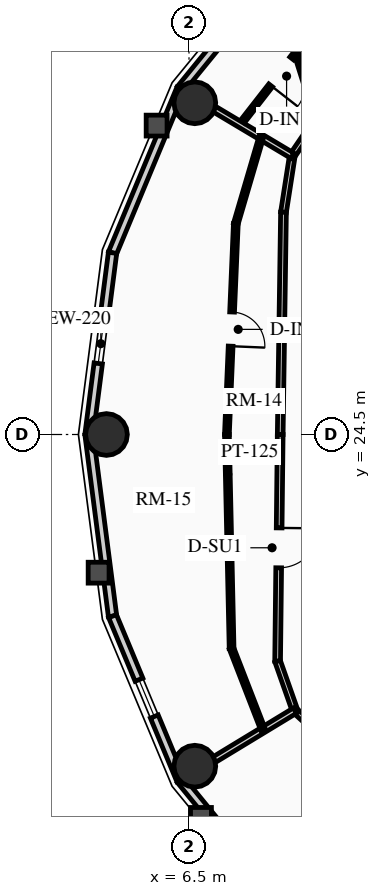
"""IFC4 building model, lengths in metres.
Left out: names, types, materials, properties, quantities, classifications, styles, units other than length and angle.
Written with IfcOpenShell. Run it as: python <this file> out.ifc"""

import sys

from ifc_helpers import new_model, si_unit, direction, frame, frame_2d, origin, origin_2d, place, context, subcontext, project, spatial, rectangle, circle, extrude, source, transform, mapped, element, fill, save


model = new_model("IFC4")
c1 = context("Model", 3, precision=1e-05, world=origin(), true_north=direction((0.0, 1.0)))
c2 = subcontext(c1, "Body", "Model", "MODEL_VIEW")
j1 = project(units=[si_unit("LENGTHUNIT", "METRE"), si_unit("PLANEANGLEUNIT", "RADIAN")], contexts=[c1])
p1 = place(None, origin())
s1 = spatial("IfcSite", under=j1, at=p1, CompositionType="ELEMENT")
p2 = place(p1, origin())
s2 = spatial("IfcBuilding", under=s1, at=p2, CompositionType="ELEMENT")
p3 = place(p2, frame((0.0, 0.0, 217.03)))
s3 = spatial("IfcBuildingStorey", under=s2, at=p3, CompositionType="ELEMENT", Elevation=217.03)
for number, where, z_axis, x_axis in (
    (1, (6.653, 33.229, 0.0), (0.0, 0.0, 1.0), (1.0, 0.0, 0.0)),
    (2, (4.328, 24.5, 0.0), (0.0, 0.0, 1.0), (1.0, 0.0, 0.0)),
    (3, (6.653, 15.771, 0.0), (0.0, 0.0, 1.0), (1.0, 0.0, 0.0)),
):
    element("IfcColumn", number, at=place(p3, frame(where, z_axis=z_axis, x_axis=x_axis)), inside=s3, PredefinedType="USERDEFINED", context=c2, shape_type="SweptSolid", body=[
        extrude(circle(Radius=0.55, at=origin_2d()), origin(), (0.0, 0.0, 1.0), 2.91),
    ])
p4 = place(p3, frame((6.282, 33.593, 0.0), z_axis=(0.0, 0.0, 1.0), x_axis=(0.632467166636, 0.774587169483, 0.0)))
e4 = element("IfcWall", 4, at=p4, inside=s3, PredefinedType="SOLIDWALL", context=c2, shape_type="SweptSolid", body=[
    extrude(rectangle(XDim=4.418, YDim=0.22, at=frame_2d((2.209, 0.0))), origin(), (0.0, 0.0, 1.0), 2.322),
])
m1 = source(origin(), c2, "Body", "SweptSolid", [
    extrude(rectangle(XDim=1.05, YDim=1.3, at=frame_2d((0.525, 0.65))), frame((0.0, 0.12, 0.0), z_axis=(0.0, -1.0, 0.0), x_axis=(1.0, 0.0, 0.0)), (0.0, 0.0, 1.0), 0.24),
])
p5 = place(p4, frame((1.684, 0.0, 0.65)))
e5 = element("IfcOpeningElement", 5, at=p5, cuts=e4, PredefinedType="OPENING", context=c2, shape_type="MappedRepresentation", body=[
    mapped(m1, transform((0.0, 0.0, 0.0), x_axis=(1.0, 0.0, 0.0), y_axis=(0.0, 1.0, 0.0), z_axis=(0.0, 0.0, 1.0), scale=1.0)),
])
p6 = place(p3, frame((4.488, 29.281, 0.0), z_axis=(0.0, 0.0, 1.0), x_axis=(0.384036305194, 0.923317993052, 0.0)))
e6 = element("IfcWall", 6, at=p6, inside=s3, PredefinedType="SOLIDWALL", context=c2, shape_type="SweptSolid", body=[
    extrude(rectangle(XDim=4.671, YDim=0.22, at=frame_2d((2.335, 0.0))), origin(), (0.0, 0.0, 1.0), 2.322),
])
p7 = place(p3, frame((3.87, 24.5, 0.0), z_axis=(0.0, 0.0, 1.0), x_axis=(0.128241318541, 0.991742993027, 0.0)))
e7 = element("IfcWall", 7, at=p7, inside=s3, PredefinedType="SOLIDWALL", context=c2, shape_type="SweptSolid", body=[
    extrude(rectangle(XDim=4.82, YDim=0.22, at=frame_2d((2.41, 0.0))), origin(), (0.0, 0.0, 1.0), 2.322),
])
p8 = place(p7, frame((1.885, 0.0, 0.65)))
e8 = element("IfcOpeningElement", 8, at=p8, cuts=e7, PredefinedType="OPENING", context=c2, shape_type="MappedRepresentation", body=[
    mapped(m1, transform((0.0, 0.0, 0.0), x_axis=(1.0, 0.0, 0.0), y_axis=(0.0, 1.0, 0.0), z_axis=(0.0, 0.0, 1.0), scale=1.0)),
])
p9 = place(p3, frame((4.488, 19.719, 0.0), z_axis=(0.0, 0.0, 1.0), x_axis=(-0.128241318541, 0.991742993027, 0.0)))
e9 = element("IfcWall", 9, at=p9, inside=s3, PredefinedType="SOLIDWALL", context=c2, shape_type="SweptSolid", body=[
    extrude(rectangle(XDim=4.82, YDim=0.22, at=frame_2d((2.41, 0.0))), origin(), (0.0, 0.0, 1.0), 2.322),
])
p10 = place(p3, frame((6.282, 15.407, 0.0), z_axis=(0.0, 0.0, 1.0), x_axis=(-0.384036305194, 0.923317993052, 0.0)))
e10 = element("IfcWall", 10, at=p10, inside=s3, PredefinedType="SOLIDWALL", context=c2, shape_type="SweptSolid", body=[
    extrude(rectangle(XDim=4.671, YDim=0.22, at=frame_2d((2.335, 0.0))), origin(), (0.0, 0.0, 1.0), 2.322),
])
p11 = place(p10, frame((1.81, 0.0, 0.65)))
e11 = element("IfcOpeningElement", 11, at=p11, cuts=e10, PredefinedType="OPENING", context=c2, shape_type="MappedRepresentation", body=[
    mapped(m1, transform((0.0, 0.0, 0.0), x_axis=(1.0, 0.0, 0.0), y_axis=(0.0, 1.0, 0.0), z_axis=(0.0, 0.0, 1.0), scale=1.0)),
])
p12 = place(p3, frame((9.076, 11.985, 0.0), z_axis=(0.0, 0.0, 1.0), x_axis=(-0.632467166636, 0.774587169483, 0.0)))
e12 = element("IfcWall", 12, at=p12, inside=s3, PredefinedType="SOLIDWALL", context=c2, shape_type="SweptSolid", body=[
    extrude(rectangle(XDim=4.418, YDim=0.22, at=frame_2d((2.209, 0.0))), origin(), (0.0, 0.0, 1.0), 2.322),
])
p13 = place(p3, frame((9.977, 32.95, 0.0), z_axis=(0.0, 0.0, 1.0), x_axis=(-0.563291804539, -0.826258036535, 0.0)))
e13 = element("IfcWall", 13, at=p13, inside=s3, PredefinedType="PARTITIONING", context=c2, shape_type="SweptSolid", body=[
    extrude(rectangle(XDim=1.346, YDim=0.15, at=frame_2d((0.673, 0.0))), origin(), (0.0, 0.0, 1.0), 2.322),
])
p14 = place(p3, frame((9.219, 31.838, 0.0), z_axis=(0.0, 0.0, 1.0), x_axis=(-0.154065528966, -0.98806063214, 0.0)))
e14 = element("IfcWall", 14, at=p14, inside=s3, PredefinedType="PARTITIONING", context=c2, shape_type="SweptSolid", body=[
    extrude(rectangle(XDim=1.507, YDim=0.15, at=frame_2d((0.753, 0.0))), origin(), (0.0, 0.0, 1.0), 2.255),
])
p15 = place(p3, frame((8.986, 30.349, 0.0), z_axis=(0.0, 0.0, 1.0), x_axis=(-0.014775478218, -0.999890836663, 0.0)))
e15 = element("IfcWall", 15, at=p15, inside=s3, PredefinedType="PARTITIONING", context=c2, shape_type="SweptSolid", body=[
    extrude(rectangle(XDim=5.849, YDim=0.15, at=frame_2d((2.925, 0.0))), origin(), (0.0, 0.0, 1.0), 2.685),
])
p16 = place(p3, frame((8.9, 24.5, 0.0), z_axis=(0.0, 0.0, 1.0), x_axis=(-0.011416369353, -0.999934831132, 0.0)))
e16 = element("IfcWall", 16, at=p16, inside=s3, PredefinedType="PARTITIONING", context=c2, shape_type="SweptSolid", body=[
    extrude(rectangle(XDim=5.967, YDim=0.15, at=frame_2d((2.983, 0.0))), origin(), (0.0, 0.0, 1.0), 2.322),
])
m2 = source(origin(), c2, "Body", "SweptSolid", [
    extrude(rectangle(XDim=1.05, YDim=2.015, at=frame_2d((0.525, 1.007))), frame((0.0, 0.085, 0.0), z_axis=(0.0, -1.0, 0.0), x_axis=(1.0, 0.0, 0.0)), (0.0, 0.0, 1.0), 0.17),
])
p17 = place(p16, frame((2.458, 0.0, 0.0)))
e17 = element("IfcOpeningElement", 17, at=p17, cuts=e16, PredefinedType="OPENING", context=c2, shape_type="MappedRepresentation", body=[
    mapped(m2, transform((0.0, 0.0, 0.0), x_axis=(1.0, 0.0, 0.0), y_axis=(0.0, 1.0, 0.0), z_axis=(0.0, 0.0, 1.0), scale=1.0)),
])
p18 = place(p3, frame((8.832, 18.534, 0.0), z_axis=(0.0, 0.0, 1.0), x_axis=(0.332031819657, -0.943268186008, 0.0)))
e18 = element("IfcWall", 18, at=p18, inside=s3, PredefinedType="PARTITIONING", context=c2, shape_type="SweptSolid", body=[
    extrude(rectangle(XDim=1.377, YDim=0.15, at=frame_2d((0.688, 0.0))), origin(), (0.0, 0.0, 1.0), 2.255),
])
p19 = place(p3, frame((9.289, 17.235, 0.0), z_axis=(0.0, 0.0, 1.0), x_axis=(0.739015164946, -0.673688790155, 0.0)))
e19 = element("IfcWall", 19, at=p19, inside=s3, PredefinedType="PARTITIONING", context=c2, shape_type="SweptSolid", body=[
    extrude(rectangle(XDim=1.446, YDim=0.15, at=frame_2d((0.723, 0.0))), origin(), (0.0, 0.0, 1.0), 2.322),
])
p20 = place(p3, frame((9.219, 31.838, 0.0), z_axis=(0.0, 0.0, 1.0), x_axis=(-0.858586714977, 0.512668365384, 0.0)))
e20 = element("IfcWall", 20, at=p20, inside=s3, PredefinedType="PARTITIONING", context=c2, shape_type="SweptSolid", body=[
    extrude(rectangle(XDim=3.401, YDim=0.16, at=frame_2d((1.701, 0.0))), origin(), (0.0, 0.0, 1.0), 2.322),
])
p21 = place(p3, frame((9.289, 17.235, 0.0), z_axis=(0.0, 0.0, 1.0), x_axis=(-0.854741081983, -0.519054604806, 0.0)))
e21 = element("IfcWall", 21, at=p21, inside=s3, PredefinedType="PARTITIONING", context=c2, shape_type="SweptSolid", body=[
    extrude(rectangle(XDim=3.499, YDim=0.16, at=frame_2d((1.75, 0.0))), origin(), (0.0, 0.0, 1.0), 2.322),
])
p22 = place(p3, frame((9.835, 32.906, 0.0), z_axis=(0.0, 0.0, 1.0), x_axis=(-0.300376803481, 0.953820620416, 0.0)))
e22 = element("IfcWall", 22, at=p22, inside=s3, PredefinedType="PARTITIONING", context=c2, shape_type="SweptSolid", body=[
    extrude(rectangle(XDim=1.719, YDim=0.125, at=frame_2d((0.859, 0.0))), origin(), (0.0, 0.0, 1.0), 2.685),
])
p23 = place(p3, frame((9.276, 34.491, 0.0), z_axis=(0.0, 0.0, 1.0), x_axis=(-0.615039973806, -0.788495929362, 0.0)))
e23 = element("IfcWall", 23, at=p23, inside=s3, PredefinedType="PARTITIONING", context=c2, shape_type="SweptSolid", body=[
    extrude(rectangle(XDim=2.228, YDim=0.125, at=frame_2d((1.114, 0.0))), origin(), (0.0, 0.0, 1.0), 2.322),
])
m3 = source(origin(), c2, "Body", "SweptSolid", [
    extrude(rectangle(XDim=0.9, YDim=2.005, at=frame_2d((0.45, 1.002))), frame((0.0, 0.073, 0.0), z_axis=(0.0, -1.0, 0.0), x_axis=(1.0, 0.0, 0.0)), (0.0, 0.0, 1.0), 0.145),
])
p24 = place(p23, frame((0.12, 0.0, 0.0)))
e24 = element("IfcOpeningElement", 24, at=p24, cuts=e23, PredefinedType="OPENING", context=c2, shape_type="MappedRepresentation", body=[
    mapped(m3, transform((0.0, 0.0, 0.0), x_axis=(1.0, 0.0, 0.0), y_axis=(0.0, 1.0, 0.0), z_axis=(0.0, 0.0, 1.0), scale=1.0)),
])
p25 = place(p3, frame((8.401, 32.326, 0.0), z_axis=(0.0, 0.0, 1.0), x_axis=(-0.281681886596, -0.959507850288, 0.0)))
e25 = element("IfcWall", 25, at=p25, inside=s3, PredefinedType="PARTITIONING", context=c2, shape_type="SweptSolid", body=[
    extrude(rectangle(XDim=2.374, YDim=0.125, at=frame_2d((1.187, 0.0))), origin(), (0.0, 0.0, 1.0), 2.255),
])
p26 = place(p3, frame((7.732, 30.048, 0.0), z_axis=(0.0, 0.0, 1.0), x_axis=(-0.042296211955, -0.999105114817, 0.0)))
e26 = element("IfcWall", 26, at=p26, inside=s3, PredefinedType="PARTITIONING", context=c2, shape_type="SweptSolid", body=[
    extrude(rectangle(XDim=5.553, YDim=0.125, at=frame_2d((2.776, 0.0))), origin(), (0.0, 0.0, 1.0), 2.685),
])
p27 = place(p26, frame((2.326, 0.0, 0.0)))
e27 = element("IfcOpeningElement", 27, at=p27, cuts=e26, PredefinedType="OPENING", context=c2, shape_type="MappedRepresentation", body=[
    mapped(m3, transform((0.0, 0.0, 0.0), x_axis=(1.0, 0.0, 0.0), y_axis=(0.0, 1.0, 0.0), z_axis=(0.0, 0.0, 1.0), scale=1.0)),
])
p28 = place(p3, frame((7.497, 24.5, 0.0), z_axis=(0.0, 0.0, 1.0), x_axis=(0.021927972859, -0.999759553096, 0.0)))
e28 = element("IfcWall", 28, at=p28, inside=s3, PredefinedType="PARTITIONING", context=c2, shape_type="SweptSolid", body=[
    extrude(rectangle(XDim=5.634, YDim=0.125, at=frame_2d((2.817, 0.0))), origin(), (0.0, 0.0, 1.0), 2.322),
])
p29 = place(p3, frame((7.621, 18.868, 0.0), z_axis=(0.0, 0.0, 1.0), x_axis=(0.361712646649, -0.93228963378, 0.0)))
e29 = element("IfcWall", 29, at=p29, inside=s3, PredefinedType="PARTITIONING", context=c2, shape_type="SweptSolid", body=[
    extrude(rectangle(XDim=2.297, YDim=0.125, at=frame_2d((1.148, 0.0))), origin(), (0.0, 0.0, 1.0), 2.255),
])
m4 = source(origin(), c2, "Body", "SweptSolid", [
    extrude(rectangle(XDim=1.05, YDim=1.3, at=frame_2d((0.525, 0.65))), frame((0.0, 0.03, 0.0), z_axis=(0.0, -1.0, 0.0), x_axis=(1.0, 0.0, 0.0)), (0.0, 0.0, 1.0), 0.06),
])
p30 = place(p8, origin())
e30 = element("IfcWindow", 30, at=p30, inside=s3, PartitioningType="SINGLE_PANEL", PredefinedType="WINDOW", context=c2, shape_type="MappedRepresentation", body=[
    mapped(m4, transform((0.0, 0.0, 0.0), x_axis=(1.0, 0.0, 0.0), y_axis=(0.0, 1.0, 0.0), z_axis=(0.0, 0.0, 1.0), scale=1.0)),
])
fill(e8, e30)
p31 = place(p11, origin())
e31 = element("IfcWindow", 31, at=p31, inside=s3, PartitioningType="SINGLE_PANEL", PredefinedType="WINDOW", context=c2, shape_type="MappedRepresentation", body=[
    mapped(m4, transform((0.0, 0.0, 0.0), x_axis=(1.0, 0.0, 0.0), y_axis=(0.0, 1.0, 0.0), z_axis=(0.0, 0.0, 1.0), scale=1.0)),
])
fill(e11, e31)
m5 = source(origin(), c2, "Body", "SweptSolid", [
    extrude(rectangle(XDim=0.9, YDim=2.005, at=frame_2d((0.45, 1.002))), frame((0.0, 0.025, 0.0), z_axis=(0.0, -1.0, 0.0), x_axis=(1.0, 0.0, 0.0)), (0.0, 0.0, 1.0), 0.05),
])
p32 = place(p24, origin())
e32 = element("IfcDoor", 32, at=p32, inside=s3, OperationType="SINGLE_SWING_RIGHT", PredefinedType="DOOR", context=c2, shape_type="MappedRepresentation", body=[
    mapped(m5, transform((0.0, 0.0, 0.0), x_axis=(1.0, 0.0, 0.0), y_axis=(0.0, 1.0, 0.0), z_axis=(0.0, 0.0, 1.0), scale=1.0)),
])
fill(e24, e32)
m6 = source(origin(), c2, "Body", "SweptSolid", [
    extrude(rectangle(XDim=1.05, YDim=2.015, at=frame_2d((0.525, 1.007))), frame((0.0, 0.025, 0.0), z_axis=(0.0, -1.0, 0.0), x_axis=(1.0, 0.0, 0.0)), (0.0, 0.0, 1.0), 0.05),
])
p33 = place(p17, origin())
e33 = element("IfcDoor", 33, at=p33, inside=s3, OperationType="SINGLE_SWING_LEFT", PredefinedType="DOOR", context=c2, shape_type="MappedRepresentation", body=[
    mapped(m6, transform((0.0, 0.0, 0.0), x_axis=(1.0, 0.0, 0.0), y_axis=(0.0, 1.0, 0.0), z_axis=(0.0, 0.0, 1.0), scale=1.0)),
])
fill(e17, e33)
p34 = place(p27, origin())
e34 = element("IfcDoor", 34, at=p34, inside=s3, OperationType="SINGLE_SWING_RIGHT", PredefinedType="DOOR", context=c2, shape_type="MappedRepresentation", body=[
    mapped(m5, transform((0.0, 0.0, 0.0), x_axis=(1.0, 0.0, 0.0), y_axis=(0.0, 1.0, 0.0), z_axis=(0.0, 0.0, 1.0), scale=1.0)),
])
fill(e27, e34)
save(model, sys.argv[1])
